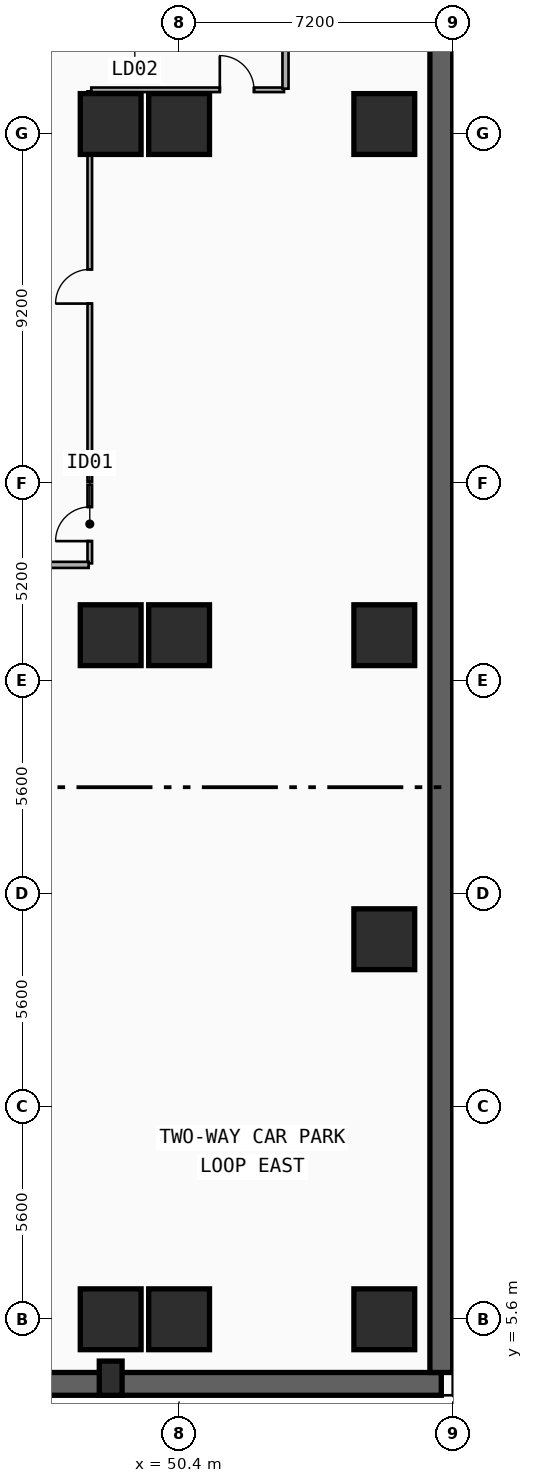
"""IFC4 building model, lengths in metres.
Left out: names, types, materials, properties, quantities, classifications, styles, units other than length and angle.
Written with IfcOpenShell. Run it as: python <this file> out.ifc"""

import sys

from ifc_helpers import new_model, si_unit, direction, frame, frame_2d, origin, origin_2d, place, context, subcontext, project, spatial, rectangle, extrude, element, fill, save


model = new_model("IFC4")
c1 = context("Model", 3, precision=1e-05, world=origin(), true_north=direction((0.0, 1.0)))
c2 = subcontext(c1, "Body", "Model", "MODEL_VIEW")
j1 = project(units=[si_unit("LENGTHUNIT", "METRE"), si_unit("PLANEANGLEUNIT", "RADIAN")], contexts=[c1])
p1 = place(None, origin())
s1 = spatial("IfcSite", under=j1, at=p1, CompositionType="ELEMENT")
p2 = place(p1, origin())
s2 = spatial("IfcBuilding", under=s1, at=p2, CompositionType="ELEMENT")
p3 = place(p2, frame((0.0, 0.0, -8.8)))
s3 = spatial("IfcBuildingStorey", under=s2, at=p3, CompositionType="ELEMENT", Elevation=-8.8)
p4 = place(p3, frame((0.3, 3.9, 0.0), z_axis=(0.0, 0.0, 1.0), x_axis=(1.0, 0.0, 0.0)))
e1 = element("IfcWall", 1, at=p4, inside=s3, PredefinedType="USERDEFINED", context=c2, shape_type="SweptSolid", body=[
    extrude(rectangle(XDim=57.0, YDim=0.6, at=frame_2d((28.5, 0.0))), origin(), (0.0, 0.0, 1.0), 4.4),
])
p5 = place(p3, frame((57.3, 4.2, 0.0), z_axis=(0.0, 0.0, 1.0), x_axis=(0.0, 1.0, 0.0)))
e2 = element("IfcWall", 2, at=p5, inside=s3, PredefinedType="USERDEFINED", context=c2, shape_type="SweptSolid", body=[
    extrude(rectangle(XDim=40.4, YDim=0.6, at=frame_2d((20.2, 0.0))), origin(), (0.0, 0.0, 1.0), 4.4),
])
for number, where, z_axis, x_axis in (
    (3, (48.6, 5.6, 0.0), (0.0, 0.0, 1.0), (1.0, 0.0, 0.0)),
    (4, (48.6, 23.6, 0.0), (0.0, 0.0, 1.0), (1.0, 0.0, 0.0)),
    (5, (48.6, 37.05, 0.0), (0.0, 0.0, 1.0), (1.0, 0.0, 0.0)),
    (6, (50.4, 5.6, 0.0), (0.0, 0.0, 1.0), (1.0, 0.0, 0.0)),
    (7, (50.4, 23.6, 0.0), (0.0, 0.0, 1.0), (1.0, 0.0, 0.0)),
    (8, (50.4, 37.05, 0.0), (0.0, 0.0, 1.0), (1.0, 0.0, 0.0)),
    (9, (55.8, 5.6, 0.0), (0.0, 0.0, 1.0), (1.0, 0.0, 0.0)),
    (10, (55.8, 15.6, 0.0), (0.0, 0.0, 1.0), (1.0, 0.0, 0.0)),
    (11, (55.8, 23.6, 0.0), (0.0, 0.0, 1.0), (1.0, 0.0, 0.0)),
    (12, (55.8, 37.05, 0.0), (0.0, 0.0, 1.0), (1.0, 0.0, 0.0)),
):
    element("IfcColumn", number, at=place(p3, frame(where, z_axis=z_axis, x_axis=x_axis)), inside=s3, PredefinedType="COLUMN", context=c2, shape_type="SweptSolid", body=[
        extrude(rectangle(XDim=1.6, YDim=1.6, at=origin_2d()), origin(), (0.0, 0.0, 1.0), 4.4),
    ])
p6 = place(p3, frame((48.6, 4.05, 0.0), z_axis=(0.0, 0.0, 1.0), x_axis=(1.0, 0.0, 0.0)))
e13 = element("IfcColumn", 13, at=p6, inside=s3, PredefinedType="PILASTER", context=c2, shape_type="SweptSolid", body=[
    extrude(rectangle(XDim=0.6, YDim=0.9, at=origin_2d()), origin(), (0.0, 0.0, 1.0), 4.4),
])
p7 = place(p3, frame((48.05, 25.49, 0.0), z_axis=(0.0, 0.0, 1.0), x_axis=(0.0, 1.0, 0.0)))
e14 = element("IfcWall", 14, at=p7, inside=s3, PredefinedType="PARTITIONING", context=c2, shape_type="SweptSolid", body=[
    extrude(rectangle(XDim=2.07, YDim=0.12, at=frame_2d((1.035, 0.0))), origin(), (0.0, 0.0, 1.0), 4.08),
])
p8 = place(p7, frame((0.585, 0.0, 0.0)))
e15 = element("IfcOpeningElement", 15, at=p8, cuts=e14, PredefinedType="OPENING", context=c2, shape_type="SweptSolid", body=[
    extrude(rectangle(XDim=0.9, YDim=2.1, at=frame_2d((0.45, 1.05))), frame((0.0, 0.07, 0.0), z_axis=(0.0, -1.0, 0.0), x_axis=(1.0, 0.0, 0.0)), (0.0, 0.0, 1.0), 0.14),
])
p9 = place(p3, frame((48.05, 27.64, 0.0), z_axis=(0.0, 0.0, 1.0), x_axis=(0.0, 1.0, 0.0)))
e16 = element("IfcWall", 16, at=p9, inside=s3, PredefinedType="PARTITIONING", context=c2, shape_type="SweptSolid", body=[
    extrude(rectangle(XDim=10.27, YDim=0.12, at=frame_2d((5.135, 0.0))), origin(), (0.0, 0.0, 1.0), 4.08),
])
p10 = place(p9, frame((4.685, 0.0, 0.0)))
e17 = element("IfcOpeningElement", 17, at=p10, cuts=e16, PredefinedType="OPENING", context=c2, shape_type="SweptSolid", body=[
    extrude(rectangle(XDim=0.9, YDim=2.1, at=frame_2d((0.45, 1.05))), frame((0.0, 0.07, 0.0), z_axis=(0.0, -1.0, 0.0), x_axis=(1.0, 0.0, 0.0)), (0.0, 0.0, 1.0), 0.14),
])
p11 = place(p3, frame((48.09, 37.95, 0.0), z_axis=(0.0, 0.0, 1.0), x_axis=(1.0, 0.0, 0.0)))
e18 = element("IfcWall", 18, at=p11, inside=s3, PredefinedType="PARTITIONING", context=c2, shape_type="SweptSolid", body=[
    extrude(rectangle(XDim=5.07, YDim=0.12, at=frame_2d((2.535, 0.0))), origin(), (0.0, 0.0, 1.0), 4.08),
])
p12 = place(p11, frame((3.382, 0.0, 0.0)))
e19 = element("IfcOpeningElement", 19, at=p12, cuts=e18, PredefinedType="OPENING", context=c2, shape_type="SweptSolid", body=[
    extrude(rectangle(XDim=0.9, YDim=2.1, at=frame_2d((0.45, 1.05))), frame((0.0, 0.07, 0.0), z_axis=(0.0, -1.0, 0.0), x_axis=(1.0, 0.0, 0.0)), (0.0, 0.0, 1.0), 0.14),
])
p13 = place(p3, frame((45.63, 25.45, 0.0), z_axis=(0.0, 0.0, 1.0), x_axis=(1.0, 0.0, 0.0)))
e20 = element("IfcWall", 20, at=p13, inside=s3, PredefinedType="PARTITIONING", context=c2, shape_type="SweptSolid", body=[
    extrude(rectangle(XDim=2.39, YDim=0.16, at=frame_2d((1.195, 0.0))), origin(), (0.0, 0.0, 1.0), 3.246),
])
p14 = place(p3, frame((53.2, 37.98, 0.0), z_axis=(0.0, 0.0, 1.0), x_axis=(0.0, 1.0, 0.0)))
e21 = element("IfcWall", 21, at=p14, inside=s3, PredefinedType="PARTITIONING", context=c2, shape_type="SweptSolid", body=[
    extrude(rectangle(XDim=1.99, YDim=0.16, at=frame_2d((0.995, 0.0))), origin(), (0.0, 0.0, 1.0), 4.08),
])
p15 = place(p8, origin())
e22 = element("IfcDoor", 22, at=p15, inside=s3, OperationType="SINGLE_SWING_LEFT", PredefinedType="DOOR", context=c2, shape_type="SweptSolid", body=[
    extrude(rectangle(XDim=0.9, YDim=2.1, at=frame_2d((0.45, 1.05))), frame((0.0, 0.025, 0.0), z_axis=(0.0, -1.0, 0.0), x_axis=(1.0, 0.0, 0.0)), (0.0, 0.0, 1.0), 0.05),
])
fill(e15, e22)
p16 = place(p10, origin())
e23 = element("IfcDoor", 23, at=p16, inside=s3, OperationType="SINGLE_SWING_LEFT", PredefinedType="DOOR", context=c2, shape_type="SweptSolid", body=[
    extrude(rectangle(XDim=0.9, YDim=2.1, at=frame_2d((0.45, 1.05))), frame((0.0, 0.025, 0.0), z_axis=(0.0, -1.0, 0.0), x_axis=(1.0, 0.0, 0.0)), (0.0, 0.0, 1.0), 0.05),
])
fill(e17, e23)
p17 = place(p12, origin())
e24 = element("IfcDoor", 24, at=p17, inside=s3, OperationType="SINGLE_SWING_LEFT", PredefinedType="DOOR", context=c2, shape_type="SweptSolid", body=[
    extrude(rectangle(XDim=0.9, YDim=2.1, at=frame_2d((0.45, 1.05))), frame((0.0, 0.025, 0.0), z_axis=(0.0, -1.0, 0.0), x_axis=(1.0, 0.0, 0.0)), (0.0, 0.0, 1.0), 0.05),
])
fill(e19, e24)
save(model, sys.argv[1])
